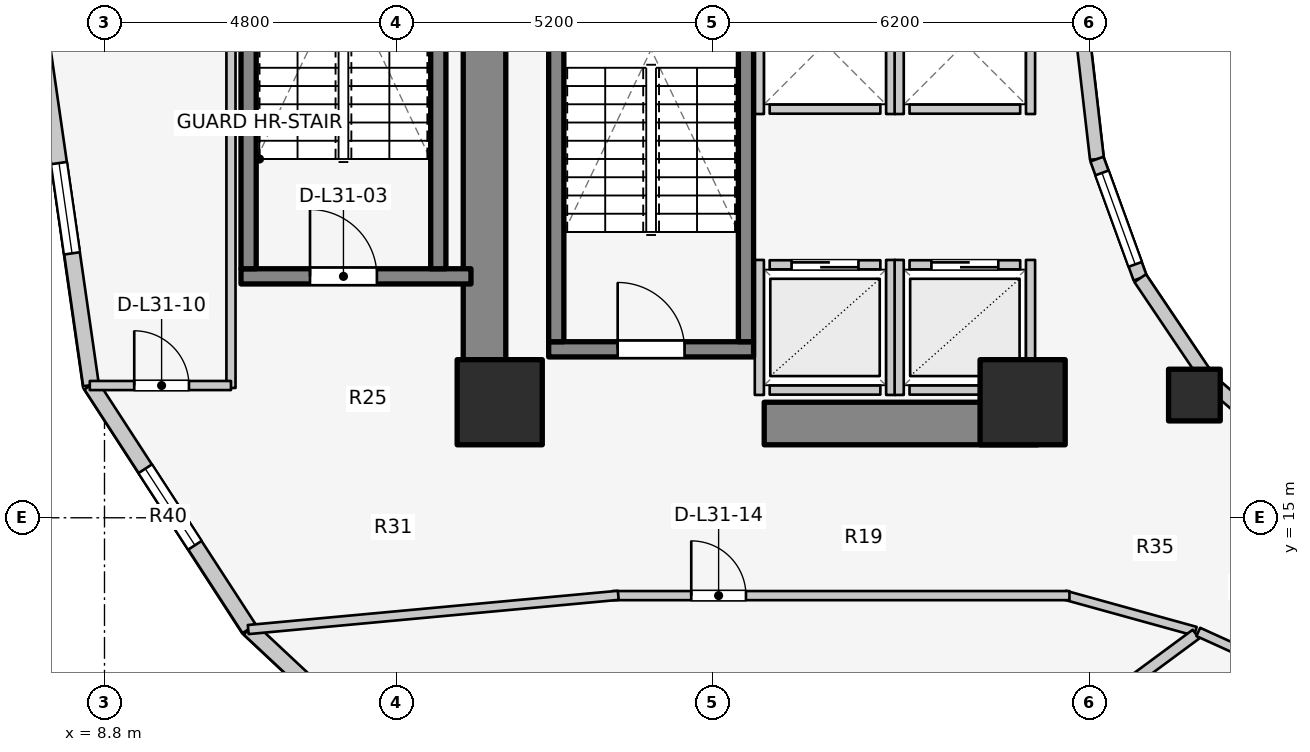
"""IFC4 building model, lengths in metres.
Left out: names, types, materials, properties, quantities, classifications, styles, units other than length and angle.
Written with IfcOpenShell. Run it as: python <this file> out.ifc"""

import sys

from ifc_helpers import new_model, si_unit, direction, frame, frame_2d, origin, origin_2d, place, context, subcontext, project, spatial, rectangle, extrude, element, fill, save


model = new_model("IFC4")
c1 = context("Model", 3, precision=1e-05, world=origin(), true_north=direction((0.0, 1.0)))
c2 = subcontext(c1, "Body", "Model", "MODEL_VIEW")
j1 = project(units=[si_unit("LENGTHUNIT", "METRE"), si_unit("PLANEANGLEUNIT", "RADIAN")], contexts=[c1])
p1 = place(None, origin())
s1 = spatial("IfcSite", under=j1, at=p1, CompositionType="ELEMENT")
p2 = place(p1, origin())
s2 = spatial("IfcBuilding", under=s1, at=p2, CompositionType="ELEMENT")
p3 = place(p2, frame((0.0, 0.0, 104.2)))
s3 = spatial("IfcBuildingStorey", under=s2, at=p3, CompositionType="ELEMENT", Elevation=104.2)
p4 = place(p3, frame((15.05, 17.05, 0.0), z_axis=(0.0, 0.0, 1.0), x_axis=(0.0, 1.0, 0.0)))
e1 = element("IfcWall", 1, at=p4, inside=s3, PredefinedType="SHEAR", context=c2, shape_type="SweptSolid", body=[
    extrude(rectangle(XDim=12.8, YDim=0.7, at=frame_2d((6.4, 0.0))), origin(), (0.0, 0.0, 1.0), 3.1),
])
p5 = place(p3, frame((19.65, 16.55, 0.0), z_axis=(0.0, 0.0, 1.0), x_axis=(1.0, 0.0, 0.0)))
e2 = element("IfcWall", 2, at=p5, inside=s3, PredefinedType="SHEAR", context=c2, shape_type="SweptSolid", body=[
    extrude(rectangle(XDim=4.5, YDim=0.7, at=frame_2d((2.25, 0.0))), origin(), (0.0, 0.0, 1.0), 3.1),
])
p6 = place(p3, frame((16.105, 17.77, 0.0), z_axis=(0.0, 0.0, 1.0), x_axis=(1.0, 0.0, 0.0)))
e3 = element("IfcWall", 3, at=p6, inside=s3, PredefinedType="SOLIDWALL", context=c2, shape_type="SweptSolid", body=[
    extrude(rectangle(XDim=3.37, YDim=0.25, at=frame_2d((1.685, 0.0))), origin(), (0.0, 0.0, 1.0), 3.1),
])
p7 = place(p6, frame((1.135, 0.0, 0.0)))
e4 = element("IfcOpeningElement", 4, at=p7, cuts=e3, PredefinedType="OPENING", context=c2, shape_type="SweptSolid", body=[
    extrude(rectangle(XDim=1.1, YDim=2.1, at=frame_2d((0.55, 1.05))), frame((0.0, 0.135, 0.0), z_axis=(0.0, -1.0, 0.0), x_axis=(1.0, 0.0, 0.0)), (0.0, 0.0, 1.0), 0.27),
])
for number, where, z_axis, x_axis in (
    (5, (16.23, 17.895, 0.0), (0.0, 0.0, 1.0), (0.0, 1.0, 0.0)),
    (6, (19.35, 17.895, 0.0), (0.0, 0.0, 1.0), (0.0, 1.0, 0.0)),
):
    element("IfcWall", number, at=place(p3, frame(where, z_axis=z_axis, x_axis=x_axis)), inside=s3, PredefinedType="SOLIDWALL", context=c2, shape_type="SweptSolid", body=[
        extrude(rectangle(XDim=7.81, YDim=0.25, at=frame_2d((3.905, 0.0))), origin(), (0.0, 0.0, 1.0), 3.1),
    ])
p8 = place(p3, frame((11.045, 18.97, 0.0), z_axis=(0.0, 0.0, 1.0), x_axis=(1.0, 0.0, 0.0)))
e7 = element("IfcWall", 7, at=p8, inside=s3, PredefinedType="SOLIDWALL", context=c2, shape_type="SweptSolid", body=[
    extrude(rectangle(XDim=3.782, YDim=0.25, at=frame_2d((1.891, 0.0))), origin(), (0.0, 0.0, 1.0), 3.1),
])
p9 = place(p8, frame((1.135, 0.0, 0.0)))
e8 = element("IfcOpeningElement", 8, at=p9, cuts=e7, PredefinedType="OPENING", context=c2, shape_type="SweptSolid", body=[
    extrude(rectangle(XDim=1.1, YDim=2.1, at=frame_2d((0.55, 1.05))), frame((0.0, 0.135, 0.0), z_axis=(0.0, -1.0, 0.0), x_axis=(1.0, 0.0, 0.0)), (0.0, 0.0, 1.0), 0.27),
])
for number, where, z_axis, x_axis in (
    (9, (11.17, 19.095, 0.0), (0.0, 0.0, 1.0), (0.0, 1.0, 0.0)),
    (10, (14.29, 19.095, 0.0), (0.0, 0.0, 1.0), (0.0, 1.0, 0.0)),
):
    element("IfcWall", number, at=place(p3, frame(where, z_axis=z_axis, x_axis=x_axis)), inside=s3, PredefinedType="SOLIDWALL", context=c2, shape_type="SweptSolid", body=[
        extrude(rectangle(XDim=7.81, YDim=0.25, at=frame_2d((3.905, 0.0))), origin(), (0.0, 0.0, 1.0), 3.1),
    ])
for number, where, z_axis, x_axis in (
    (11, (15.3, 16.9, 0.0), (0.0, 0.0, 1.0), (1.0, 0.0, 0.0)),
    (12, (23.9, 16.9, 0.0), (0.0, 0.0, 1.0), (1.0, 0.0, 0.0)),
):
    element("IfcColumn", number, at=place(p3, frame(where, z_axis=z_axis, x_axis=x_axis)), inside=s3, PredefinedType="COLUMN", context=c2, shape_type="SweptSolid", body=[
        extrude(rectangle(XDim=1.4, YDim=1.4, at=origin_2d()), origin(), (0.0, 0.0, 1.0), 3.1),
    ])
p10 = place(p3, frame((26.725, 17.018, 0.0), z_axis=(0.0, 0.0, 1.0), x_axis=(1.0, 0.0, 0.0)))
e13 = element("IfcColumn", 13, at=p10, inside=s3, PredefinedType="COLUMN", context=c2, shape_type="SweptSolid", body=[
    extrude(rectangle(XDim=0.85, YDim=0.85, at=origin_2d()), origin(), (0.0, 0.0, 1.0), 3.1),
])
p11 = place(p3, frame((24.88, 23.0, 0.0), z_axis=(0.0, 0.0, 1.0), x_axis=(0.114711713601, -0.993398823617, 0.0)))
e14 = element("IfcWall", 14, at=p11, inside=s3, PredefinedType="STANDARD", context=c2, shape_type="SweptSolid", body=[
    extrude(rectangle(XDim=2.115, YDim=0.23, at=frame_2d((1.058, 0.0))), origin(), (0.0, 0.0, 1.0), 2.84),
])
p12 = place(p3, frame((25.123, 20.898, 0.0), z_axis=(0.0, 0.0, 1.0), x_axis=(0.341423187295, -0.93990968033, 0.0)))
e15 = element("IfcWall", 15, at=p12, inside=s3, PredefinedType="STANDARD", context=c2, shape_type="SweptSolid", body=[
    extrude(rectangle(XDim=2.084, YDim=0.23, at=frame_2d((1.042, 0.0))), origin(), (0.0, 0.0, 1.0), 2.84),
])
p13 = place(p12, frame((0.242, 0.0, 0.85)))
e16 = element("IfcOpeningElement", 16, at=p13, cuts=e15, PredefinedType="OPENING", context=c2, shape_type="SweptSolid", body=[
    extrude(rectangle(XDim=1.6, YDim=1.65, at=frame_2d((0.8, 0.825))), frame((0.0, 0.125, 0.0), z_axis=(0.0, -1.0, 0.0), x_axis=(1.0, 0.0, 0.0)), (0.0, 0.0, 1.0), 0.25),
])
p14 = place(p3, frame((25.834, 18.94, 0.0), z_axis=(0.0, 0.0, 1.0), x_axis=(0.558197800898, -0.829707909492, 0.0)))
e17 = element("IfcWall", 17, at=p14, inside=s3, PredefinedType="STANDARD", context=c2, shape_type="SweptSolid", body=[
    extrude(rectangle(XDim=2.027, YDim=0.23, at=frame_2d((1.013, 0.0))), origin(), (0.0, 0.0, 1.0), 2.16),
])
p15 = place(p3, frame((26.965, 17.258, 0.0), z_axis=(0.0, 0.0, 1.0), x_axis=(0.752576694707, -0.658504607869, 0.0)))
e18 = element("IfcWall", 18, at=p15, inside=s3, PredefinedType="STANDARD", context=c2, shape_type="SweptSolid", body=[
    extrude(rectangle(XDim=1.959, YDim=0.23, at=frame_2d((0.98, 0.0))), origin(), (0.0, 0.0, 1.0), 2.16),
])
p16 = place(p3, frame((7.74, 23.0, 0.0), z_axis=(0.0, 0.0, 1.0), x_axis=(0.142572472068, -0.98978436551, 0.0)))
e19 = element("IfcWall", 19, at=p16, inside=s3, PredefinedType="STANDARD", context=c2, shape_type="SweptSolid", body=[
    extrude(rectangle(XDim=5.879, YDim=0.26, at=frame_2d((2.939, 0.0))), origin(), (0.0, 0.0, 1.0), 2.85),
])
p17 = place(p16, frame((2.189, 0.0, 0.75)))
e20 = element("IfcOpeningElement", 20, at=p17, cuts=e19, PredefinedType="OPENING", context=c2, shape_type="SweptSolid", body=[
    extrude(rectangle(XDim=1.5, YDim=1.6, at=frame_2d((0.75, 0.8))), frame((0.0, 0.14, 0.0), z_axis=(0.0, -1.0, 0.0), x_axis=(1.0, 0.0, 0.0)), (0.0, 0.0, 1.0), 0.28),
])
p18 = place(p3, frame((8.578, 17.181, 0.0), z_axis=(0.0, 0.0, 1.0), x_axis=(0.544388392991, -0.838833283541, 0.0)))
e21 = element("IfcWall", 21, at=p18, inside=s3, PredefinedType="STANDARD", context=c2, shape_type="SweptSolid", body=[
    extrude(rectangle(XDim=4.778, YDim=0.26, at=frame_2d((2.389, 0.0))), origin(), (0.0, 0.0, 1.0), 2.85),
])
p19 = place(p18, frame((1.639, 0.0, 0.75)))
e22 = element("IfcOpeningElement", 22, at=p19, cuts=e21, PredefinedType="OPENING", context=c2, shape_type="SweptSolid", body=[
    extrude(rectangle(XDim=1.5, YDim=1.6, at=frame_2d((0.75, 0.8))), frame((0.0, 0.14, 0.0), z_axis=(0.0, -1.0, 0.0), x_axis=(1.0, 0.0, 0.0)), (0.0, 0.0, 1.0), 0.28),
])
p20 = place(p3, frame((11.179, 13.173, 0.0), z_axis=(0.0, 0.0, 1.0), x_axis=(0.730162452258, -0.68327358599, 0.0)))
e23 = element("IfcWall", 23, at=p20, inside=s3, PredefinedType="STANDARD", context=c2, shape_type="SweptSolid", body=[
    extrude(rectangle(XDim=4.868, YDim=0.26, at=frame_2d((2.434, 0.0))), origin(), (0.0, 0.0, 1.0), 2.85),
])
p21 = place(p20, frame((1.234, 0.0, 0.75)))
e24 = element("IfcOpeningElement", 24, at=p21, cuts=e23, PredefinedType="OPENING", context=c2, shape_type="SweptSolid", body=[
    extrude(rectangle(XDim=2.4, YDim=1.7, at=frame_2d((1.2, 0.85))), frame((0.0, 0.14, 0.0), z_axis=(0.0, -1.0, 0.0), x_axis=(1.0, 0.0, 0.0)), (0.0, 0.0, 1.0), 0.28),
])
p22 = place(p3, frame((19.74, 19.16, 0.0), z_axis=(0.0, 0.0, 1.0), x_axis=(1.0, 0.0, 0.0)))
e25 = element("IfcWall", 25, at=p22, inside=s3, PredefinedType="SOLIDWALL", context=c2, shape_type="SweptSolid", body=[
    extrude(rectangle(XDim=1.82, YDim=0.15, at=frame_2d((0.91, 0.0))), origin(), (0.0, 0.0, 1.0), 2.855),
])
p23 = place(p22, frame((0.36, 0.0, 0.0)))
e26 = element("IfcOpeningElement", 26, at=p23, cuts=e25, PredefinedType="OPENING", context=c2, shape_type="SweptSolid", body=[
    extrude(rectangle(XDim=1.1, YDim=2.1, at=frame_2d((0.55, 1.05))), frame((0.0, 0.085, 0.0), z_axis=(0.0, -1.0, 0.0), x_axis=(1.0, 0.0, 0.0)), (0.0, 0.0, 1.0), 0.17),
])
p24 = place(p3, frame((19.74, 17.1, 0.0), z_axis=(0.0, 0.0, 1.0), x_axis=(1.0, 0.0, 0.0)))
e27 = element("IfcWall", 27, at=p24, inside=s3, PredefinedType="SOLIDWALL", context=c2, shape_type="SweptSolid", body=[
    extrude(rectangle(XDim=1.82, YDim=0.15, at=frame_2d((0.91, 0.0))), origin(), (0.0, 0.0, 1.0), 2.855),
])
p25 = place(p3, frame((19.57, 17.02, 0.0), z_axis=(0.0, 0.0, 1.0), x_axis=(0.0, 1.0, 0.0)))
e28 = element("IfcWall", 28, at=p25, inside=s3, PredefinedType="SOLIDWALL", context=c2, shape_type="SweptSolid", body=[
    extrude(rectangle(XDim=2.22, YDim=0.15, at=frame_2d((1.11, 0.0))), origin(), (0.0, 0.0, 1.0), 2.12),
])
p26 = place(p3, frame((21.73, 17.02, 0.0), z_axis=(0.0, 0.0, 1.0), x_axis=(0.0, 1.0, 0.0)))
e29 = element("IfcWall", 29, at=p26, inside=s3, PredefinedType="SOLIDWALL", context=c2, shape_type="SweptSolid", body=[
    extrude(rectangle(XDim=2.22, YDim=0.15, at=frame_2d((1.11, 0.0))), origin(), (0.0, 0.0, 1.0), 2.855),
])
p27 = place(p3, frame((22.04, 19.16, 0.0), z_axis=(0.0, 0.0, 1.0), x_axis=(1.0, 0.0, 0.0)))
e30 = element("IfcWall", 30, at=p27, inside=s3, PredefinedType="SOLIDWALL", context=c2, shape_type="SweptSolid", body=[
    extrude(rectangle(XDim=1.82, YDim=0.15, at=frame_2d((0.91, 0.0))), origin(), (0.0, 0.0, 1.0), 2.12),
])
p28 = place(p27, frame((0.36, 0.0, 0.0)))
e31 = element("IfcOpeningElement", 31, at=p28, cuts=e30, PredefinedType="OPENING", context=c2, shape_type="SweptSolid", body=[
    extrude(rectangle(XDim=1.1, YDim=2.1, at=frame_2d((0.55, 1.05))), frame((0.0, 0.085, 0.0), z_axis=(0.0, -1.0, 0.0), x_axis=(1.0, 0.0, 0.0)), (0.0, 0.0, 1.0), 0.17),
])
p29 = place(p3, frame((22.04, 17.1, 0.0), z_axis=(0.0, 0.0, 1.0), x_axis=(1.0, 0.0, 0.0)))
e32 = element("IfcWall", 32, at=p29, inside=s3, PredefinedType="SOLIDWALL", context=c2, shape_type="SweptSolid", body=[
    extrude(rectangle(XDim=1.82, YDim=0.15, at=frame_2d((0.91, 0.0))), origin(), (0.0, 0.0, 1.0), 2.12),
])
p30 = place(p3, frame((21.87, 17.02, 0.0), z_axis=(0.0, 0.0, 1.0), x_axis=(0.0, 1.0, 0.0)))
e33 = element("IfcWall", 33, at=p30, inside=s3, PredefinedType="SOLIDWALL", context=c2, shape_type="SweptSolid", body=[
    extrude(rectangle(XDim=2.22, YDim=0.15, at=frame_2d((1.11, 0.0))), origin(), (0.0, 0.0, 1.0), 2.855),
])
p31 = place(p3, frame((24.03, 17.02, 0.0), z_axis=(0.0, 0.0, 1.0), x_axis=(0.0, 1.0, 0.0)))
e34 = element("IfcWall", 34, at=p31, inside=s3, PredefinedType="SOLIDWALL", context=c2, shape_type="SweptSolid", body=[
    extrude(rectangle(XDim=2.22, YDim=0.15, at=frame_2d((1.11, 0.0))), origin(), (0.0, 0.0, 1.0), 2.12),
])
p32 = place(p3, frame((19.74, 21.72, 0.0), z_axis=(0.0, 0.0, 1.0), x_axis=(1.0, 0.0, 0.0)))
e35 = element("IfcWall", 35, at=p32, inside=s3, PredefinedType="SOLIDWALL", context=c2, shape_type="SweptSolid", body=[
    extrude(rectangle(XDim=1.82, YDim=0.15, at=frame_2d((0.91, 0.0))), origin(), (0.0, 0.0, 1.0), 2.855),
])
for number, where, z_axis, x_axis in (
    (36, (19.57, 21.64, 0.0), (0.0, 0.0, 1.0), (0.0, 1.0, 0.0)),
    (37, (21.73, 21.64, 0.0), (0.0, 0.0, 1.0), (0.0, 1.0, 0.0)),
):
    element("IfcWall", number, at=place(p3, frame(where, z_axis=z_axis, x_axis=x_axis)), inside=s3, PredefinedType="SOLIDWALL", context=c2, shape_type="SweptSolid", body=[
        extrude(rectangle(XDim=2.32, YDim=0.15, at=frame_2d((1.16, 0.0))), origin(), (0.0, 0.0, 1.0), 2.855),
    ])
p33 = place(p3, frame((22.04, 21.72, 0.0), z_axis=(0.0, 0.0, 1.0), x_axis=(1.0, 0.0, 0.0)))
e38 = element("IfcWall", 38, at=p33, inside=s3, PredefinedType="SOLIDWALL", context=c2, shape_type="SweptSolid", body=[
    extrude(rectangle(XDim=1.82, YDim=0.15, at=frame_2d((0.91, 0.0))), origin(), (0.0, 0.0, 1.0), 2.12),
])
p34 = place(p3, frame((21.87, 21.64, 0.0), z_axis=(0.0, 0.0, 1.0), x_axis=(0.0, 1.0, 0.0)))
e39 = element("IfcWall", 39, at=p34, inside=s3, PredefinedType="SOLIDWALL", context=c2, shape_type="SweptSolid", body=[
    extrude(rectangle(XDim=2.32, YDim=0.15, at=frame_2d((1.16, 0.0))), origin(), (0.0, 0.0, 1.0), 2.855),
])
p35 = place(p3, frame((24.03, 21.64, 0.0), z_axis=(0.0, 0.0, 1.0), x_axis=(0.0, 1.0, 0.0)))
e40 = element("IfcWall", 40, at=p35, inside=s3, PredefinedType="SOLIDWALL", context=c2, shape_type="SweptSolid", body=[
    extrude(rectangle(XDim=2.32, YDim=0.15, at=frame_2d((1.16, 0.0))), origin(), (0.0, 0.0, 1.0), 2.12),
])
p36 = place(p3, frame((10.88, 17.135, 0.0), z_axis=(0.0, 0.0, 1.0), x_axis=(0.0, 1.0, 0.0)))
e41 = element("IfcWall", 41, at=p36, inside=s3, PredefinedType="PARTITIONING", context=c2, shape_type="SweptSolid", body=[
    extrude(rectangle(XDim=11.73, YDim=0.15, at=frame_2d((5.865, 0.0))), origin(), (0.0, 0.0, 1.0), 2.12),
])
p37 = place(p3, frame((8.558, 17.175, 0.0), z_axis=(0.0, 0.0, 1.0), x_axis=(1.0, 0.0, 0.0)))
e42 = element("IfcWall", 42, at=p37, inside=s3, PredefinedType="PARTITIONING", context=c2, shape_type="SweptSolid", body=[
    extrude(rectangle(XDim=2.322, YDim=0.15, at=frame_2d((1.161, 0.0))), origin(), (0.0, 0.0, 1.0), 2.855),
])
p38 = place(p37, frame((0.731, 0.0, 0.0)))
e43 = element("IfcOpeningElement", 43, at=p38, cuts=e42, PredefinedType="OPENING", context=c2, shape_type="SweptSolid", body=[
    extrude(rectangle(XDim=0.9, YDim=2.1, at=frame_2d((0.45, 1.05))), frame((0.0, 0.085, 0.0), z_axis=(0.0, -1.0, 0.0), x_axis=(1.0, 0.0, 0.0)), (0.0, 0.0, 1.0), 0.17),
])
p39 = place(p3, frame((26.742, 13.133, 0.0), z_axis=(0.0, 0.0, 1.0), x_axis=(-0.963833843713, 0.266503886865, 0.0)))
e44 = element("IfcWall", 44, at=p39, inside=s3, PredefinedType="PARTITIONING", context=c2, shape_type="SweptSolid", body=[
    extrude(rectangle(XDim=2.232, YDim=0.15, at=frame_2d((1.116, 0.0))), origin(), (0.0, 0.0, 1.0), 2.272),
])
p40 = place(p3, frame((17.15, 13.72, 0.0), z_axis=(0.0, 0.0, 1.0), x_axis=(1.0, 0.0, 0.0)))
e45 = element("IfcWall", 45, at=p40, inside=s3, PredefinedType="PARTITIONING", context=c2, shape_type="SweptSolid", body=[
    extrude(rectangle(XDim=7.52, YDim=0.15, at=frame_2d((3.76, 0.0))), origin(), (0.0, 0.0, 1.0), 2.272),
])
p41 = place(p40, frame((1.3, 0.0, 0.0)))
e46 = element("IfcOpeningElement", 46, at=p41, cuts=e45, PredefinedType="OPENING", context=c2, shape_type="SweptSolid", body=[
    extrude(rectangle(XDim=0.9, YDim=2.1, at=frame_2d((0.45, 1.05))), frame((0.0, 0.085, 0.0), z_axis=(0.0, -1.0, 0.0), x_axis=(1.0, 0.0, 0.0)), (0.0, 0.0, 1.0), 0.17),
])
p42 = place(p3, frame((17.25, 13.725, 0.0), z_axis=(0.0, 0.0, 1.0), x_axis=(-0.995748209098, -0.092116795851, 0.0)))
e47 = element("IfcWall", 47, at=p42, inside=s3, PredefinedType="PARTITIONING", context=c2, shape_type="SweptSolid", body=[
    extrude(rectangle(XDim=6.112, YDim=0.15, at=frame_2d((3.056, 0.0))), origin(), (0.0, 0.0, 1.0), 2.142),
])
p43 = place(p3, frame((26.751, 13.086, 0.0), z_axis=(0.0, 0.0, 1.0), x_axis=(-0.80430981394, -0.594210167533, 0.0)))
e48 = element("IfcWall", 48, at=p43, inside=s3, PredefinedType="PARTITIONING", context=c2, shape_type="SweptSolid", body=[
    extrude(rectangle(XDim=9.146, YDim=0.18, at=frame_2d((4.573, 0.0))), origin(), (0.0, 0.0, 1.0), 2.272),
])
p44 = place(p3, frame((26.789, 13.123, 0.0), z_axis=(0.0, 0.0, 1.0), x_axis=(0.910568469686, -0.41335827319, 0.0)))
e49 = element("IfcWall", 49, at=p44, inside=s3, PredefinedType="PARTITIONING", context=c2, shape_type="SweptSolid", body=[
    extrude(rectangle(XDim=2.772, YDim=0.15, at=frame_2d((1.386, 0.0))), origin(), (0.0, 0.0, 1.0), 2.272),
])
p45 = place(p44, frame((0.911, 0.0, 0.0)))
e50 = element("IfcOpeningElement", 50, at=p45, cuts=e49, PredefinedType="OPENING", context=c2, shape_type="SweptSolid", body=[
    extrude(rectangle(XDim=0.95, YDim=2.1, at=frame_2d((0.475, 1.05))), frame((0.0, 0.085, 0.0), z_axis=(0.0, -1.0, 0.0), x_axis=(1.0, 0.0, 0.0)), (0.0, 0.0, 1.0), 0.17),
])
p46 = place(p13, origin())
e51 = element("IfcWindow", 51, at=p46, inside=s3, PartitioningType="SINGLE_PANEL", PredefinedType="WINDOW", context=c2, shape_type="SweptSolid", body=[
    extrude(rectangle(XDim=1.6, YDim=1.65, at=frame_2d((0.8, 0.825))), frame((0.0, 0.03, 0.0), z_axis=(0.0, -1.0, 0.0), x_axis=(1.0, 0.0, 0.0)), (0.0, 0.0, 1.0), 0.06),
])
fill(e16, e51)
p47 = place(p17, origin())
e52 = element("IfcWindow", 52, at=p47, inside=s3, PartitioningType="SINGLE_PANEL", PredefinedType="WINDOW", context=c2, shape_type="SweptSolid", body=[
    extrude(rectangle(XDim=1.5, YDim=1.6, at=frame_2d((0.75, 0.8))), frame((0.0, 0.03, 0.0), z_axis=(0.0, -1.0, 0.0), x_axis=(1.0, 0.0, 0.0)), (0.0, 0.0, 1.0), 0.06),
])
fill(e20, e52)
p48 = place(p19, origin())
e53 = element("IfcWindow", 53, at=p48, inside=s3, PartitioningType="SINGLE_PANEL", PredefinedType="WINDOW", context=c2, shape_type="SweptSolid", body=[
    extrude(rectangle(XDim=1.5, YDim=1.6, at=frame_2d((0.75, 0.8))), frame((0.0, 0.03, 0.0), z_axis=(0.0, -1.0, 0.0), x_axis=(1.0, 0.0, 0.0)), (0.0, 0.0, 1.0), 0.06),
])
fill(e22, e53)
p49 = place(p7, origin())
e54 = element("IfcDoor", 54, at=p49, inside=s3, OperationType="SINGLE_SWING_LEFT", PredefinedType="DOOR", context=c2, shape_type="SweptSolid", body=[
    extrude(rectangle(XDim=1.1, YDim=2.1, at=frame_2d((0.55, 1.05))), frame((0.0, 0.025, 0.0), z_axis=(0.0, -1.0, 0.0), x_axis=(1.0, 0.0, 0.0)), (0.0, 0.0, 1.0), 0.05),
])
fill(e4, e54)
p50 = place(p9, origin())
e55 = element("IfcDoor", 55, at=p50, inside=s3, OperationType="SINGLE_SWING_LEFT", PredefinedType="DOOR", context=c2, shape_type="SweptSolid", body=[
    extrude(rectangle(XDim=1.1, YDim=2.1, at=frame_2d((0.55, 1.05))), frame((0.0, 0.025, 0.0), z_axis=(0.0, -1.0, 0.0), x_axis=(1.0, 0.0, 0.0)), (0.0, 0.0, 1.0), 0.05),
])
fill(e8, e55)
p51 = place(p23, origin())
e56 = element("IfcDoor", 56, at=p51, inside=s3, OperationType="DOUBLE_DOOR_SLIDING", PredefinedType="DOOR", context=c2, shape_type="SweptSolid", body=[
    extrude(rectangle(XDim=1.1, YDim=2.1, at=frame_2d((0.55, 1.05))), frame((0.0, 0.025, 0.0), z_axis=(0.0, -1.0, 0.0), x_axis=(1.0, 0.0, 0.0)), (0.0, 0.0, 1.0), 0.05),
])
fill(e26, e56)
p52 = place(p28, origin())
e57 = element("IfcDoor", 57, at=p52, inside=s3, OperationType="DOUBLE_DOOR_SLIDING", PredefinedType="DOOR", context=c2, shape_type="SweptSolid", body=[
    extrude(rectangle(XDim=1.1, YDim=2.1, at=frame_2d((0.55, 1.05))), frame((0.0, 0.025, 0.0), z_axis=(0.0, -1.0, 0.0), x_axis=(1.0, 0.0, 0.0)), (0.0, 0.0, 1.0), 0.05),
])
fill(e31, e57)
p53 = place(p38, origin())
e58 = element("IfcDoor", 58, at=p53, inside=s3, OperationType="SINGLE_SWING_LEFT", PredefinedType="DOOR", context=c2, shape_type="SweptSolid", body=[
    extrude(rectangle(XDim=0.9, YDim=2.1, at=frame_2d((0.45, 1.05))), frame((0.0, 0.025, 0.0), z_axis=(0.0, -1.0, 0.0), x_axis=(1.0, 0.0, 0.0)), (0.0, 0.0, 1.0), 0.05),
])
fill(e43, e58)
p54 = place(p41, origin())
e59 = element("IfcDoor", 59, at=p54, inside=s3, OperationType="SINGLE_SWING_LEFT", PredefinedType="DOOR", context=c2, shape_type="SweptSolid", body=[
    extrude(rectangle(XDim=0.9, YDim=2.1, at=frame_2d((0.45, 1.05))), frame((0.0, 0.025, 0.0), z_axis=(0.0, -1.0, 0.0), x_axis=(1.0, 0.0, 0.0)), (0.0, 0.0, 1.0), 0.05),
])
fill(e46, e59)
save(model, sys.argv[1])
